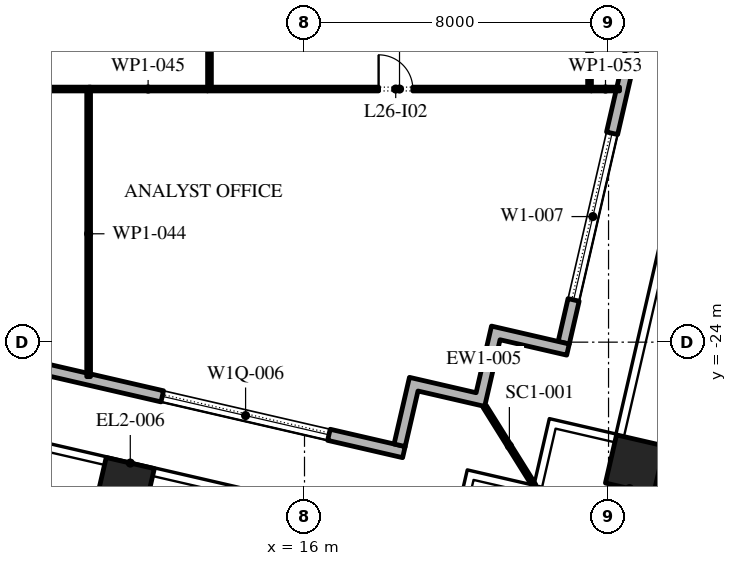
"""IFC4 building model, lengths in metres.
Left out: names, types, materials, properties, quantities, classifications, styles, units other than length and angle.
Written with IfcOpenShell. Run it as: python <this file> out.ifc"""

import sys

from ifc_helpers import new_model, si_unit, direction, frame, frame_2d, origin, origin_2d, place, context, subcontext, project, spatial, polyline, rectangle, outline, extrude, element, fill, save


model = new_model("IFC4")
c1 = context("Model", 3, precision=1e-05, world=origin(), true_north=direction((0.0, 1.0)))
c2 = subcontext(c1, "Body", "Model", "MODEL_VIEW")
j1 = project(units=[si_unit("LENGTHUNIT", "METRE"), si_unit("PLANEANGLEUNIT", "RADIAN")], contexts=[c1])
p1 = place(None, origin())
s1 = spatial("IfcSite", under=j1, at=p1, CompositionType="ELEMENT")
p2 = place(p1, origin())
s2 = spatial("IfcBuilding", under=s1, at=p2, CompositionType="ELEMENT")
p3 = place(p2, frame((0.0, 0.0, 122.4)))
s3 = spatial("IfcBuildingStorey", under=s2, at=p3, CompositionType="ELEMENT", Elevation=122.4)
for number, where, z_axis, x_axis in (
    (1, (11.27, -27.815, 0.0), (0.0, 0.0, 1.0), (0.974, -0.225, 0.0)),
    (2, (24.698, -27.22, 0.0), (0.0, 0.0, 1.0), (0.974, -0.225, 0.0)),
    (3, (22.539, -28.569, 0.0), (0.0, 0.0, 1.0), (0.974, -0.225, 0.0)),
):
    element("IfcColumn", number, at=place(p3, frame(where, z_axis=z_axis, x_axis=x_axis)), inside=s3, PredefinedType="COLUMN", context=c2, shape_type="SweptSolid", body=[
        extrude(rectangle(XDim=1.3, YDim=1.3, at=origin_2d()), origin(), (0.0, 0.0, 1.0), 4.2),
    ])
p4 = place(p3, frame((-31.078, -15.421, 0.0), z_axis=(0.0, 0.0, 1.0), x_axis=(0.974370456532, -0.224949357493, 0.0)))
e4 = element("IfcWall", 4, at=p4, inside=s3, PredefinedType="STANDARD", context=c2, shape_type="SweptSolid", body=[
    extrude(rectangle(XDim=51.0, YDim=0.3, at=frame_2d((25.5, 0.0))), origin(), (0.0, 0.0, 1.0), 4.0),
])
p5 = place(p4, frame((1.875, 0.0, 0.45)))
e5 = element("IfcOpeningElement", 5, at=p5, cuts=e4, PredefinedType="OPENING", context=c2, shape_type="SweptSolid", body=[
    extrude(rectangle(XDim=4.5, YDim=2.65, at=frame_2d((2.25, 1.325))), frame((0.0, 0.16, 0.0), z_axis=(0.0, -1.0, 0.0), x_axis=(1.0, 0.0, 0.0)), (0.0, 0.0, 1.0), 0.32),
])
p6 = place(p4, frame((10.275, 0.0, 0.45)))
e6 = element("IfcOpeningElement", 6, at=p6, cuts=e4, PredefinedType="OPENING", context=c2, shape_type="SweptSolid", body=[
    extrude(rectangle(XDim=4.5, YDim=2.525, at=frame_2d((2.25, 1.262))), frame((0.0, 0.16, 0.0), z_axis=(0.0, -1.0, 0.0), x_axis=(1.0, 0.0, 0.0)), (0.0, 0.0, 1.0), 0.32),
])
p7 = place(p4, frame((18.825, 0.0, 0.45)))
e7 = element("IfcOpeningElement", 7, at=p7, cuts=e4, PredefinedType="OPENING", context=c2, shape_type="SweptSolid", body=[
    extrude(rectangle(XDim=4.5, YDim=2.5, at=frame_2d((2.25, 1.25))), frame((0.0, 0.16, 0.0), z_axis=(0.0, -1.0, 0.0), x_axis=(1.0, 0.0, 0.0)), (0.0, 0.0, 1.0), 0.32),
])
p8 = place(p4, frame((28.425, 0.0, 0.0)))
e8 = element("IfcOpeningElement", 8, at=p8, cuts=e4, PredefinedType="OPENING", context=c2, shape_type="SweptSolid", body=[
    extrude(rectangle(XDim=2.4, YDim=2.9, at=frame_2d((1.2, 1.45))), frame((0.0, 0.16, 0.0), z_axis=(0.0, -1.0, 0.0), x_axis=(1.0, 0.0, 0.0)), (0.0, 0.0, 1.0), 0.32),
])
p9 = place(p4, frame((35.925, 0.0, 0.45)))
e9 = element("IfcOpeningElement", 9, at=p9, cuts=e4, PredefinedType="OPENING", context=c2, shape_type="SweptSolid", body=[
    extrude(rectangle(XDim=4.5, YDim=2.45, at=frame_2d((2.25, 1.225))), frame((0.0, 0.16, 0.0), z_axis=(0.0, -1.0, 0.0), x_axis=(1.0, 0.0, 0.0)), (0.0, 0.0, 1.0), 0.32),
])
p10 = place(p4, frame((44.475, 0.0, 0.45)))
e10 = element("IfcOpeningElement", 10, at=p10, cuts=e4, PredefinedType="OPENING", context=c2, shape_type="SweptSolid", body=[
    extrude(rectangle(XDim=4.5, YDim=2.45, at=frame_2d((2.25, 1.225))), frame((0.0, 0.16, 0.0), z_axis=(0.0, -1.0, 0.0), x_axis=(1.0, 0.0, 0.0)), (0.0, 0.0, 1.0), 0.32),
])
p11 = place(p3, frame((22.82, -24.016, 0.0), z_axis=(0.0, 0.0, 1.0), x_axis=(0.224953880882, 0.974369412223, 0.0)))
e11 = element("IfcWall", 11, at=p11, inside=s3, PredefinedType="STANDARD", context=c2, shape_type="SweptSolid", body=[
    extrude(rectangle(XDim=49.5, YDim=0.3, at=frame_2d((24.75, 0.0))), origin(), (0.0, 0.0, 1.0), 4.0),
])
p12 = place(p11, frame((1.157, 0.0, 0.45)))
e12 = element("IfcOpeningElement", 12, at=p12, cuts=e11, PredefinedType="OPENING", context=c2, shape_type="SweptSolid", body=[
    extrude(rectangle(XDim=4.5, YDim=3.05, at=frame_2d((2.25, 1.525))), frame((0.0, 0.16, 0.0), z_axis=(0.0, -1.0, 0.0), x_axis=(1.0, 0.0, 0.0)), (0.0, 0.0, 1.0), 0.32),
])
p13 = place(p11, frame((8.121, 0.0, 0.45)))
e13 = element("IfcOpeningElement", 13, at=p13, cuts=e11, PredefinedType="OPENING", context=c2, shape_type="SweptSolid", body=[
    extrude(rectangle(XDim=4.5, YDim=3.05, at=frame_2d((2.25, 1.525))), frame((0.0, 0.16, 0.0), z_axis=(0.0, -1.0, 0.0), x_axis=(1.0, 0.0, 0.0)), (0.0, 0.0, 1.0), 0.32),
])
p14 = place(p11, frame((15.236, 0.0, 0.45)))
e14 = element("IfcOpeningElement", 14, at=p14, cuts=e11, PredefinedType="OPENING", context=c2, shape_type="SweptSolid", body=[
    extrude(rectangle(XDim=4.5, YDim=3.05, at=frame_2d((2.25, 1.525))), frame((0.0, 0.16, 0.0), z_axis=(0.0, -1.0, 0.0), x_axis=(1.0, 0.0, 0.0)), (0.0, 0.0, 1.0), 0.32),
])
p15 = place(p11, frame((23.4, 0.0, 0.0)))
e15 = element("IfcOpeningElement", 15, at=p15, cuts=e11, PredefinedType="OPENING", context=c2, shape_type="SweptSolid", body=[
    extrude(rectangle(XDim=2.4, YDim=3.5, at=frame_2d((1.2, 1.75))), frame((0.0, 0.16, 0.0), z_axis=(0.0, -1.0, 0.0), x_axis=(1.0, 0.0, 0.0)), (0.0, 0.0, 1.0), 0.32),
])
p16 = place(p11, frame((29.464, 0.0, 0.45)))
e16 = element("IfcOpeningElement", 16, at=p16, cuts=e11, PredefinedType="OPENING", context=c2, shape_type="SweptSolid", body=[
    extrude(rectangle(XDim=4.5, YDim=2.875, at=frame_2d((2.25, 1.438))), frame((0.0, 0.16, 0.0), z_axis=(0.0, -1.0, 0.0), x_axis=(1.0, 0.0, 0.0)), (0.0, 0.0, 1.0), 0.32),
])
p17 = place(p11, frame((36.579, 0.0, 0.45)))
e17 = element("IfcOpeningElement", 17, at=p17, cuts=e11, PredefinedType="OPENING", context=c2, shape_type="SweptSolid", body=[
    extrude(rectangle(XDim=4.5, YDim=2.825, at=frame_2d((2.25, 1.413))), frame((0.0, 0.16, 0.0), z_axis=(0.0, -1.0, 0.0), x_axis=(1.0, 0.0, 0.0)), (0.0, 0.0, 1.0), 0.32),
])
p18 = place(p11, frame((43.693, 0.0, 0.45)))
e18 = element("IfcOpeningElement", 18, at=p18, cuts=e11, PredefinedType="OPENING", context=c2, shape_type="SweptSolid", body=[
    extrude(rectangle(XDim=4.5, YDim=2.75, at=frame_2d((2.25, 1.375))), frame((0.0, 0.16, 0.0), z_axis=(0.0, -1.0, 0.0), x_axis=(1.0, 0.0, 0.0)), (0.0, 0.0, 1.0), 0.32),
])
p19 = place(p3, origin())
e19 = element("IfcWall", 19, at=p19, inside=s3, PredefinedType="STANDARD", context=c2, shape_type="SweptSolid", body=[
    extrude(outline(polyline([(20.515, -25.331), (20.92, -23.577), (22.967, -24.049), (22.899, -24.342), (21.145, -23.937), (20.74, -25.691), (18.986, -25.286), (18.649, -26.747), (18.357, -26.68), (18.762, -24.926), (20.515, -25.331)])), origin(), (0.0, 0.0, 1.0), 4.0),
])
p20 = place(p3, frame((20.74, -25.691, -0.05), z_axis=(0.0, 0.0, 1.0), x_axis=(0.529972121605, -0.848015064914, 0.0)))
e20 = element("IfcWall", 20, at=p20, inside=s3, PredefinedType="STANDARD", context=c2, shape_type="SweptSolid", body=[
    extrude(rectangle(XDim=2.455, YDim=0.1, at=frame_2d((1.228, 0.0))), origin(), (0.0, 0.0, 1.0), 4.05),
])
p21 = place(p3, frame((2.04, -17.34, 0.0), z_axis=(0.0, 0.0, 1.0), x_axis=(1.0, 0.0, 0.0)))
e21 = element("IfcWall", 21, at=p21, inside=s3, PredefinedType="PARTITIONING", context=c2, shape_type="SweptSolid", body=[
    extrude(rectangle(XDim=8.33, YDim=0.1, at=frame_2d((4.165, 0.0))), origin(), (0.0, 0.0, 1.0), 4.0),
])
p22 = place(p3, frame((10.32, -17.39, 0.0), z_axis=(0.0, 0.0, 1.0), x_axis=(0.0, -1.0, 0.0)))
e22 = element("IfcWall", 22, at=p22, inside=s3, PredefinedType="PARTITIONING", context=c2, shape_type="SweptSolid", body=[
    extrude(rectangle(XDim=7.517, YDim=0.1, at=frame_2d((3.759, 0.0))), origin(), (0.0, 0.0, 1.0), 4.0),
])
p23 = place(p3, frame((10.32, -17.34, 0.0), z_axis=(0.0, 0.0, 1.0), x_axis=(1.0, 0.0, 0.0)))
e23 = element("IfcWall", 23, at=p23, inside=s3, PredefinedType="PARTITIONING", context=c2, shape_type="SweptSolid", body=[
    extrude(rectangle(XDim=3.13, YDim=0.1, at=frame_2d((1.565, 0.0))), origin(), (0.0, 0.0, 1.0), 4.0),
])
p24 = place(p3, frame((13.45, -17.34, 0.0), z_axis=(0.0, 0.0, 1.0), x_axis=(1.0, 0.0, 0.0)))
e24 = element("IfcWall", 24, at=p24, inside=s3, PredefinedType="PARTITIONING", context=c2, shape_type="SweptSolid", body=[
    extrude(rectangle(XDim=10.1, YDim=0.1, at=frame_2d((5.05, 0.0))), origin(), (0.0, 0.0, 1.0), 4.0),
])
p25 = place(p24, frame((4.5, 0.0, 0.0)))
e25 = element("IfcOpeningElement", 25, at=p25, cuts=e24, PredefinedType="OPENING", context=c2, shape_type="SweptSolid", body=[
    extrude(rectangle(XDim=0.9, YDim=2.1, at=frame_2d((0.45, 1.05))), frame((0.0, 0.06, 0.0), z_axis=(0.0, -1.0, 0.0), x_axis=(1.0, 0.0, 0.0)), (0.0, 0.0, 1.0), 0.12),
])
p26 = place(p3, frame((13.5, -7.775, 0.0), z_axis=(0.0, 0.0, 1.0), x_axis=(0.0, -1.0, 0.0)))
e26 = element("IfcWall", 26, at=p26, inside=s3, PredefinedType="PARTITIONING", context=c2, shape_type="SweptSolid", body=[
    extrude(rectangle(XDim=9.515, YDim=0.1, at=frame_2d((4.758, 0.0))), origin(), (0.0, 0.0, 1.0), 4.0),
])
p27 = place(p3, frame((23.55, -17.34, 0.0), z_axis=(0.0, 0.0, 1.0), x_axis=(1.0, 0.0, 0.0)))
e27 = element("IfcWall", 27, at=p27, inside=s3, PredefinedType="PARTITIONING", context=c2, shape_type="SweptSolid", body=[
    extrude(rectangle(XDim=0.74, YDim=0.1, at=frame_2d((0.37, 0.0))), origin(), (0.0, 0.0, 1.0), 4.0),
])
p28 = place(p3, frame((23.5, -7.775, 0.0), z_axis=(0.0, 0.0, 1.0), x_axis=(0.0, -1.0, 0.0)))
e28 = element("IfcWall", 28, at=p28, inside=s3, PredefinedType="PARTITIONING", context=c2, shape_type="SweptSolid", body=[
    extrude(rectangle(XDim=9.515, YDim=0.1, at=frame_2d((4.758, 0.0))), origin(), (0.0, 0.0, 1.0), 4.0),
])
p29 = place(p10, origin())
e29 = element("IfcWindow", 29, at=p29, inside=s3, PartitioningType="DOUBLE_PANEL_VERTICAL", PredefinedType="WINDOW", context=c2, shape_type="SweptSolid", body=[
    extrude(rectangle(XDim=4.5, YDim=2.45, at=frame_2d((2.25, 1.225))), frame((0.0, 0.03, 0.0), z_axis=(0.0, -1.0, 0.0), x_axis=(1.0, 0.0, 0.0)), (0.0, 0.0, 1.0), 0.06),
])
fill(e10, e29)
p30 = place(p12, origin())
e30 = element("IfcWindow", 30, at=p30, inside=s3, PartitioningType="DOUBLE_PANEL_VERTICAL", PredefinedType="WINDOW", context=c2, shape_type="SweptSolid", body=[
    extrude(rectangle(XDim=4.5, YDim=3.05, at=frame_2d((2.25, 1.525))), frame((0.0, 0.03, 0.0), z_axis=(0.0, -1.0, 0.0), x_axis=(1.0, 0.0, 0.0)), (0.0, 0.0, 1.0), 0.06),
])
fill(e12, e30)
p31 = place(p25, origin())
e31 = element("IfcDoor", 31, at=p31, inside=s3, OperationType="SINGLE_SWING_RIGHT", PredefinedType="DOOR", context=c2, shape_type="SweptSolid", body=[
    extrude(rectangle(XDim=0.9, YDim=2.1, at=frame_2d((0.45, 1.05))), frame((0.0, 0.025, 0.0), z_axis=(0.0, -1.0, 0.0), x_axis=(1.0, 0.0, 0.0)), (0.0, 0.0, 1.0), 0.05),
])
fill(e25, e31)
save(model, sys.argv[1])
